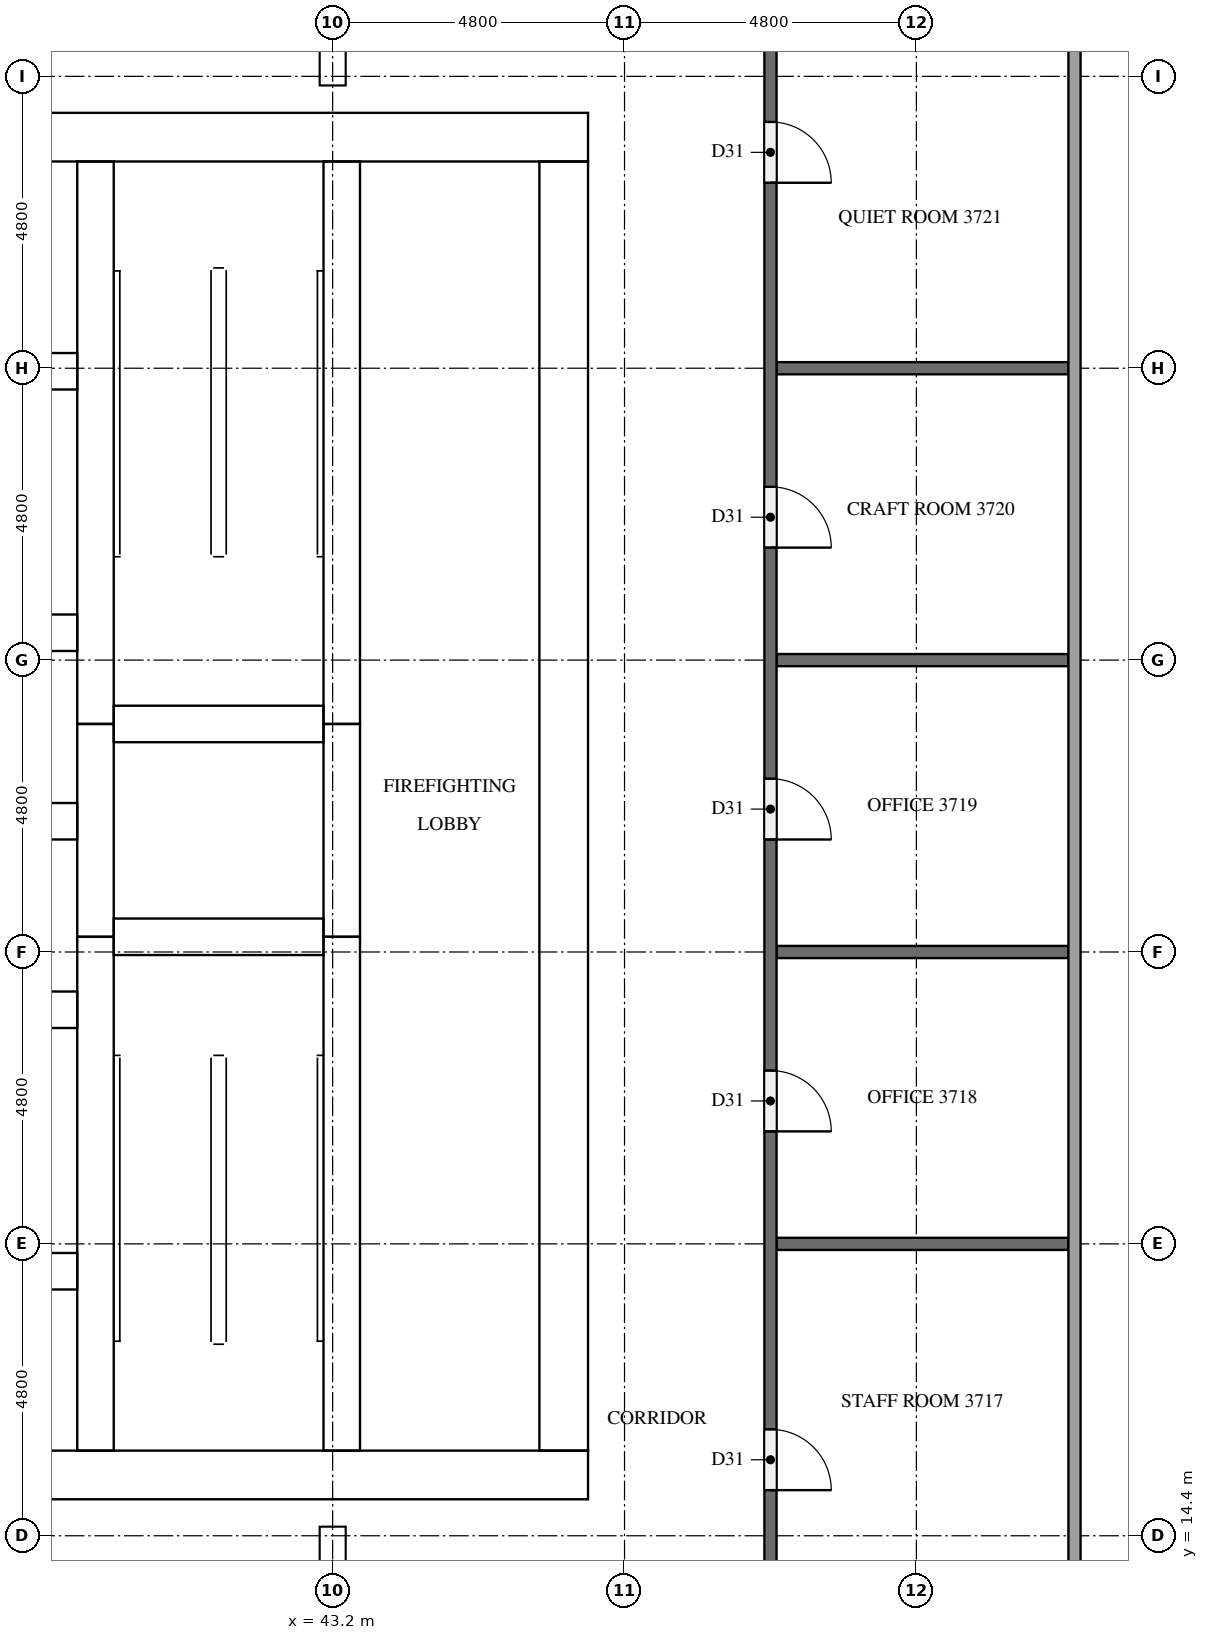
"""IFC4 building model, lengths in metres.
Left out: names, types, materials, properties, quantities, classifications, styles, units other than length and angle.
Written with IfcOpenShell. Run it as: python <this file> out.ifc"""

import sys

from ifc_helpers import new_model, si_unit, direction, frame, frame_2d, origin, place, context, subcontext, project, spatial, rectangle, extrude, element, fill, save


model = new_model("IFC4")
c1 = context("Model", 3, precision=1e-05, world=origin(), true_north=direction((0.0, 1.0)))
c2 = subcontext(c1, "Body", "Model", "MODEL_VIEW")
j1 = project(units=[si_unit("LENGTHUNIT", "METRE"), si_unit("PLANEANGLEUNIT", "RADIAN")], contexts=[c1])
p1 = place(None, origin())
s1 = spatial("IfcSite", under=j1, at=p1, CompositionType="ELEMENT")
p2 = place(p1, origin())
s2 = spatial("IfcBuilding", under=s1, at=p2, CompositionType="ELEMENT")
p3 = place(p2, frame((0.0, 0.0, 143.6)))
s3 = spatial("IfcBuildingStorey", under=s2, at=p3, CompositionType="ELEMENT", Elevation=143.6)
p4 = place(p3, frame((15.0, 15.4, 0.0), z_axis=(0.0, 0.0, 1.0), x_axis=(1.0, 0.0, 0.0)))
e1 = element("IfcWall", 1, at=p4, inside=s3, PredefinedType="SHEAR", context=c2, shape_type="SweptSolid", body=[
    extrude(rectangle(XDim=32.4, YDim=0.8, at=frame_2d((16.2, 0.0))), origin(), (0.0, 0.0, 1.0), 5.1),
])
p5 = place(p4, frame((15.3, 0.0, 0.0)))
e2 = element("IfcOpeningElement", 2, at=p5, cuts=e1, PredefinedType="OPENING", context=c2, shape_type="SweptSolid", body=[
    extrude(rectangle(XDim=1.8, YDim=2.1, at=frame_2d((0.9, 1.05))), frame((0.0, 0.41, 0.0), z_axis=(0.0, -1.0, 0.0), x_axis=(1.0, 0.0, 0.0)), (0.0, 0.0, 1.0), 0.82),
])
p6 = place(p3, frame((15.0, 37.4, 0.0), z_axis=(0.0, 0.0, 1.0), x_axis=(1.0, 0.0, 0.0)))
e3 = element("IfcWall", 3, at=p6, inside=s3, PredefinedType="SHEAR", context=c2, shape_type="SweptSolid", body=[
    extrude(rectangle(XDim=32.4, YDim=0.8, at=frame_2d((16.2, 0.0))), origin(), (0.0, 0.0, 1.0), 5.1),
])
p7 = place(p6, frame((15.3, 0.0, 0.0)))
e4 = element("IfcOpeningElement", 4, at=p7, cuts=e3, PredefinedType="OPENING", context=c2, shape_type="SweptSolid", body=[
    extrude(rectangle(XDim=1.8, YDim=2.1, at=frame_2d((0.9, 1.05))), frame((0.0, 0.41, 0.0), z_axis=(0.0, -1.0, 0.0), x_axis=(1.0, 0.0, 0.0)), (0.0, 0.0, 1.0), 0.82),
])
p8 = place(p6, frame((1.51, 0.0, 0.0)))
e5 = element("IfcOpeningElement", 5, at=p8, cuts=e3, PredefinedType="OPENING", context=c2, shape_type="SweptSolid", body=[
    extrude(rectangle(XDim=1.0, YDim=2.1, at=frame_2d((0.5, 1.05))), frame((0.0, 0.41, 0.0), z_axis=(0.0, -1.0, 0.0), x_axis=(1.0, 0.0, 0.0)), (0.0, 0.0, 1.0), 0.82),
])
p9 = place(p6, frame((5.11, 0.0, 0.0)))
e6 = element("IfcOpeningElement", 6, at=p9, cuts=e3, PredefinedType="OPENING", context=c2, shape_type="SweptSolid", body=[
    extrude(rectangle(XDim=1.0, YDim=2.1, at=frame_2d((0.5, 1.05))), frame((0.0, 0.41, 0.0), z_axis=(0.0, -1.0, 0.0), x_axis=(1.0, 0.0, 0.0)), (0.0, 0.0, 1.0), 0.82),
])
p10 = place(p3, frame((47.0, 15.8, 0.0), z_axis=(0.0, 0.0, 1.0), x_axis=(0.0, 1.0, 0.0)))
e7 = element("IfcWall", 7, at=p10, inside=s3, PredefinedType="SHEAR", context=c2, shape_type="SweptSolid", body=[
    extrude(rectangle(XDim=21.2, YDim=0.8, at=frame_2d((10.6, 0.0))), origin(), (0.0, 0.0, 1.0), 5.1),
])
p11 = place(p10, frame((10.3, 0.0, 0.0)))
e8 = element("IfcOpeningElement", 8, at=p11, cuts=e7, PredefinedType="OPENING", context=c2, shape_type="SweptSolid", body=[
    extrude(rectangle(XDim=1.2, YDim=2.1, at=frame_2d((0.6, 1.05))), frame((0.0, 0.41, 0.0), z_axis=(0.0, -1.0, 0.0), x_axis=(1.0, 0.0, 0.0)), (0.0, 0.0, 1.0), 0.82),
])
p12 = place(p3, frame((39.3, 15.8, 0.0), z_axis=(0.0, 0.0, 1.0), x_axis=(0.0, 1.0, 0.0)))
e9 = element("IfcWall", 9, at=p12, inside=s3, PredefinedType="SHEAR", context=c2, shape_type="SweptSolid", body=[
    extrude(rectangle(XDim=8.45, YDim=0.6, at=frame_2d((4.225, 0.0))), origin(), (0.0, 0.0, 1.0), 5.1),
])
p13 = place(p3, frame((39.3, 24.25, 0.0), z_axis=(0.0, 0.0, 1.0), x_axis=(0.0, 1.0, 0.0)))
e10 = element("IfcWall", 10, at=p13, inside=s3, PredefinedType="SHEAR", context=c2, shape_type="SweptSolid", body=[
    extrude(rectangle(XDim=3.5, YDim=0.6, at=frame_2d((1.75, 0.0))), origin(), (0.0, 0.0, 1.0), 5.1),
])
p14 = place(p3, frame((39.3, 27.75, 0.0), z_axis=(0.0, 0.0, 1.0), x_axis=(0.0, 1.0, 0.0)))
e11 = element("IfcWall", 11, at=p14, inside=s3, PredefinedType="SHEAR", context=c2, shape_type="SweptSolid", body=[
    extrude(rectangle(XDim=9.25, YDim=0.6, at=frame_2d((4.625, 0.0))), origin(), (0.0, 0.0, 1.0), 5.1),
])
p15 = place(p3, frame((43.35, 15.8, 0.0), z_axis=(0.0, 0.0, 1.0), x_axis=(0.0, 1.0, 0.0)))
e12 = element("IfcWall", 12, at=p15, inside=s3, PredefinedType="SHEAR", context=c2, shape_type="SweptSolid", body=[
    extrude(rectangle(XDim=8.45, YDim=0.6, at=frame_2d((4.225, 0.0))), origin(), (0.0, 0.0, 1.0), 5.1),
])
p16 = place(p15, frame((0.4, 0.0, 0.0)))
e13 = element("IfcOpeningElement", 13, at=p16, cuts=e12, PredefinedType="OPENING", context=c2, shape_type="SweptSolid", body=[
    extrude(rectangle(XDim=1.2, YDim=2.1, at=frame_2d((0.6, 1.05))), frame((0.0, 0.31, 0.0), z_axis=(0.0, -1.0, 0.0), x_axis=(1.0, 0.0, 0.0)), (0.0, 0.0, 1.0), 0.62),
])
p17 = place(p3, frame((43.35, 24.25, 0.0), z_axis=(0.0, 0.0, 1.0), x_axis=(0.0, 1.0, 0.0)))
e14 = element("IfcWall", 14, at=p17, inside=s3, PredefinedType="SHEAR", context=c2, shape_type="SweptSolid", body=[
    extrude(rectangle(XDim=3.5, YDim=0.6, at=frame_2d((1.75, 0.0))), origin(), (0.0, 0.0, 1.0), 5.1),
])
p18 = place(p17, frame((1.2, 0.0, 0.0)))
e15 = element("IfcOpeningElement", 15, at=p18, cuts=e14, PredefinedType="OPENING", context=c2, shape_type="SweptSolid", body=[
    extrude(rectangle(XDim=1.1, YDim=2.1, at=frame_2d((0.55, 1.05))), frame((0.0, 0.31, 0.0), z_axis=(0.0, -1.0, 0.0), x_axis=(1.0, 0.0, 0.0)), (0.0, 0.0, 1.0), 0.62),
])
p19 = place(p3, frame((43.35, 27.75, 0.0), z_axis=(0.0, 0.0, 1.0), x_axis=(0.0, 1.0, 0.0)))
e16 = element("IfcWall", 16, at=p19, inside=s3, PredefinedType="SHEAR", context=c2, shape_type="SweptSolid", body=[
    extrude(rectangle(XDim=9.25, YDim=0.6, at=frame_2d((4.625, 0.0))), origin(), (0.0, 0.0, 1.0), 5.1),
])
p20 = place(p19, frame((7.65, 0.0, 0.0)))
e17 = element("IfcOpeningElement", 17, at=p20, cuts=e16, PredefinedType="OPENING", context=c2, shape_type="SweptSolid", body=[
    extrude(rectangle(XDim=1.2, YDim=2.1, at=frame_2d((0.6, 1.05))), frame((0.0, 0.31, 0.0), z_axis=(0.0, -1.0, 0.0), x_axis=(1.0, 0.0, 0.0)), (0.0, 0.0, 1.0), 0.62),
])
for number, where, z_axis, x_axis in (
    (18, (39.6, 24.25, 0.0), (0.0, 0.0, 1.0), (1.0, 0.0, 0.0)),
    (19, (39.6, 27.75, 0.0), (0.0, 0.0, 1.0), (1.0, 0.0, 0.0)),
):
    element("IfcWall", number, at=place(p3, frame(where, z_axis=z_axis, x_axis=x_axis)), inside=s3, PredefinedType="SHEAR", context=c2, shape_type="SweptSolid", body=[
        extrude(rectangle(XDim=3.45, YDim=0.6, at=frame_2d((1.725, 0.0))), origin(), (0.0, 0.0, 1.0), 5.1),
    ])
p21 = place(p3, frame((33.4, 18.75, 0.0), z_axis=(0.0, 0.0, 1.0), x_axis=(1.0, 0.0, 0.0)))
e20 = element("IfcWall", 20, at=p21, inside=s3, PredefinedType="SHEAR", context=c2, shape_type="SweptSolid", body=[
    extrude(rectangle(XDim=5.6, YDim=0.6, at=frame_2d((2.8, 0.0))), origin(), (0.0, 0.0, 1.0), 5.1),
])
p22 = place(p21, frame((1.25, 0.0, 0.0)))
e21 = element("IfcOpeningElement", 21, at=p22, cuts=e20, PredefinedType="OPENING", context=c2, shape_type="SweptSolid", body=[
    extrude(rectangle(XDim=1.1, YDim=2.1, at=frame_2d((0.55, 1.05))), frame((0.0, 0.31, 0.0), z_axis=(0.0, -1.0, 0.0), x_axis=(1.0, 0.0, 0.0)), (0.0, 0.0, 1.0), 0.62),
])
p23 = place(p21, frame((3.85, 0.0, 0.0)))
e22 = element("IfcOpeningElement", 22, at=p23, cuts=e20, PredefinedType="OPENING", context=c2, shape_type="SweptSolid", body=[
    extrude(rectangle(XDim=1.1, YDim=2.1, at=frame_2d((0.55, 1.05))), frame((0.0, 0.31, 0.0), z_axis=(0.0, -1.0, 0.0), x_axis=(1.0, 0.0, 0.0)), (0.0, 0.0, 1.0), 0.62),
])
p24 = place(p3, frame((23.4, 23.05, 0.0), z_axis=(0.0, 0.0, 1.0), x_axis=(1.0, 0.0, 0.0)))
e23 = element("IfcWall", 23, at=p24, inside=s3, PredefinedType="SHEAR", context=c2, shape_type="SweptSolid", body=[
    extrude(rectangle(XDim=15.6, YDim=0.6, at=frame_2d((7.8, 0.0))), origin(), (0.0, 0.0, 1.0), 5.1),
])
p25 = place(p24, frame((0.311, 0.0, 0.0)))
e24 = element("IfcOpeningElement", 24, at=p25, cuts=e23, PredefinedType="OPENING", context=c2, shape_type="SweptSolid", body=[
    extrude(rectangle(XDim=1.0, YDim=2.1, at=frame_2d((0.5, 1.05))), frame((0.0, 0.31, 0.0), z_axis=(0.0, -1.0, 0.0), x_axis=(1.0, 0.0, 0.0)), (0.0, 0.0, 1.0), 0.62),
])
p26 = place(p24, frame((2.945, 0.0, 0.0)))
e25 = element("IfcOpeningElement", 25, at=p26, cuts=e23, PredefinedType="OPENING", context=c2, shape_type="SweptSolid", body=[
    extrude(rectangle(XDim=1.0, YDim=2.1, at=frame_2d((0.5, 1.05))), frame((0.0, 0.31, 0.0), z_axis=(0.0, -1.0, 0.0), x_axis=(1.0, 0.0, 0.0)), (0.0, 0.0, 1.0), 0.62),
])
p27 = place(p24, frame((10.845, 0.0, 0.0)))
e26 = element("IfcOpeningElement", 26, at=p27, cuts=e23, PredefinedType="OPENING", context=c2, shape_type="SweptSolid", body=[
    extrude(rectangle(XDim=1.0, YDim=2.1, at=frame_2d((0.5, 1.05))), frame((0.0, 0.31, 0.0), z_axis=(0.0, -1.0, 0.0), x_axis=(1.0, 0.0, 0.0)), (0.0, 0.0, 1.0), 0.62),
])
p28 = place(p24, frame((13.478, 0.0, 0.0)))
e27 = element("IfcOpeningElement", 27, at=p28, cuts=e23, PredefinedType="OPENING", context=c2, shape_type="SweptSolid", body=[
    extrude(rectangle(XDim=1.0, YDim=2.1, at=frame_2d((0.5, 1.05))), frame((0.0, 0.31, 0.0), z_axis=(0.0, -1.0, 0.0), x_axis=(1.0, 0.0, 0.0)), (0.0, 0.0, 1.0), 0.62),
])
p29 = place(p3, frame((23.4, 26.15, 0.0), z_axis=(0.0, 0.0, 1.0), x_axis=(1.0, 0.0, 0.0)))
e28 = element("IfcWall", 28, at=p29, inside=s3, PredefinedType="SHEAR", context=c2, shape_type="SweptSolid", body=[
    extrude(rectangle(XDim=15.6, YDim=0.6, at=frame_2d((7.8, 0.0))), origin(), (0.0, 0.0, 1.0), 5.1),
])
p30 = place(p3, frame((23.4, 29.25, 0.0), z_axis=(0.0, 0.0, 1.0), x_axis=(1.0, 0.0, 0.0)))
e29 = element("IfcWall", 29, at=p30, inside=s3, PredefinedType="SHEAR", context=c2, shape_type="SweptSolid", body=[
    extrude(rectangle(XDim=15.6, YDim=0.6, at=frame_2d((7.8, 0.0))), origin(), (0.0, 0.0, 1.0), 5.1),
])
p31 = place(p30, frame((0.667, 0.0, 0.0)))
e30 = element("IfcOpeningElement", 30, at=p31, cuts=e29, PredefinedType="OPENING", context=c2, shape_type="SweptSolid", body=[
    extrude(rectangle(XDim=1.1, YDim=2.1, at=frame_2d((0.55, 1.05))), frame((0.0, 0.31, 0.0), z_axis=(0.0, -1.0, 0.0), x_axis=(1.0, 0.0, 0.0)), (0.0, 0.0, 1.0), 0.62),
])
p32 = place(p30, frame((3.3, 0.0, 0.0)))
e31 = element("IfcOpeningElement", 31, at=p32, cuts=e29, PredefinedType="OPENING", context=c2, shape_type="SweptSolid", body=[
    extrude(rectangle(XDim=1.1, YDim=2.1, at=frame_2d((0.55, 1.05))), frame((0.0, 0.31, 0.0), z_axis=(0.0, -1.0, 0.0), x_axis=(1.0, 0.0, 0.0)), (0.0, 0.0, 1.0), 0.62),
])
p33 = place(p30, frame((5.933, 0.0, 0.0)))
e32 = element("IfcOpeningElement", 32, at=p33, cuts=e29, PredefinedType="OPENING", context=c2, shape_type="SweptSolid", body=[
    extrude(rectangle(XDim=1.1, YDim=2.1, at=frame_2d((0.55, 1.05))), frame((0.0, 0.31, 0.0), z_axis=(0.0, -1.0, 0.0), x_axis=(1.0, 0.0, 0.0)), (0.0, 0.0, 1.0), 0.62),
])
p34 = place(p30, frame((8.567, 0.0, 0.0)))
e33 = element("IfcOpeningElement", 33, at=p34, cuts=e29, PredefinedType="OPENING", context=c2, shape_type="SweptSolid", body=[
    extrude(rectangle(XDim=1.1, YDim=2.1, at=frame_2d((0.55, 1.05))), frame((0.0, 0.31, 0.0), z_axis=(0.0, -1.0, 0.0), x_axis=(1.0, 0.0, 0.0)), (0.0, 0.0, 1.0), 0.62),
])
p35 = place(p30, frame((11.2, 0.0, 0.0)))
e34 = element("IfcOpeningElement", 34, at=p35, cuts=e29, PredefinedType="OPENING", context=c2, shape_type="SweptSolid", body=[
    extrude(rectangle(XDim=1.1, YDim=2.1, at=frame_2d((0.55, 1.05))), frame((0.0, 0.31, 0.0), z_axis=(0.0, -1.0, 0.0), x_axis=(1.0, 0.0, 0.0)), (0.0, 0.0, 1.0), 0.62),
])
p36 = place(p30, frame((13.833, 0.0, 0.0)))
e35 = element("IfcOpeningElement", 35, at=p36, cuts=e29, PredefinedType="OPENING", context=c2, shape_type="SweptSolid", body=[
    extrude(rectangle(XDim=1.1, YDim=2.1, at=frame_2d((0.55, 1.05))), frame((0.0, 0.31, 0.0), z_axis=(0.0, -1.0, 0.0), x_axis=(1.0, 0.0, 0.0)), (0.0, 0.0, 1.0), 0.62),
])
p37 = place(p3, frame((33.4, 33.55, 0.0), z_axis=(0.0, 0.0, 1.0), x_axis=(1.0, 0.0, 0.0)))
e36 = element("IfcWall", 36, at=p37, inside=s3, PredefinedType="SHEAR", context=c2, shape_type="SweptSolid", body=[
    extrude(rectangle(XDim=5.6, YDim=0.6, at=frame_2d((2.8, 0.0))), origin(), (0.0, 0.0, 1.0), 5.1),
])
p38 = place(p37, frame((1.25, 0.0, 0.0)))
e37 = element("IfcOpeningElement", 37, at=p38, cuts=e36, PredefinedType="OPENING", context=c2, shape_type="SweptSolid", body=[
    extrude(rectangle(XDim=1.1, YDim=2.1, at=frame_2d((0.55, 1.05))), frame((0.0, 0.31, 0.0), z_axis=(0.0, -1.0, 0.0), x_axis=(1.0, 0.0, 0.0)), (0.0, 0.0, 1.0), 0.62),
])
p39 = place(p37, frame((3.85, 0.0, 0.0)))
e38 = element("IfcOpeningElement", 38, at=p39, cuts=e36, PredefinedType="OPENING", context=c2, shape_type="SweptSolid", body=[
    extrude(rectangle(XDim=1.1, YDim=2.1, at=frame_2d((0.55, 1.05))), frame((0.0, 0.31, 0.0), z_axis=(0.0, -1.0, 0.0), x_axis=(1.0, 0.0, 0.0)), (0.0, 0.0, 1.0), 0.62),
])
for number, where, z_axis, x_axis in (
    (39, (50.5, 19.2, 0.0), (0.0, 0.0, 1.0), (1.0, 0.0, 0.0)),
    (40, (50.5, 24.0, 0.0), (0.0, 0.0, 1.0), (1.0, 0.0, 0.0)),
    (41, (50.5, 28.8, 0.0), (0.0, 0.0, 1.0), (1.0, 0.0, 0.0)),
    (42, (50.5, 33.6, 0.0), (0.0, 0.0, 1.0), (1.0, 0.0, 0.0)),
):
    element("IfcWall", number, at=place(p3, frame(where, z_axis=z_axis, x_axis=x_axis)), inside=s3, PredefinedType="PARTITIONING", context=c2, shape_type="SweptSolid", body=[
        extrude(rectangle(XDim=4.8, YDim=0.2, at=frame_2d((2.4, 0.0))), origin(), (0.0, 0.0, 1.0), 5.1),
    ])
p40 = place(p3, frame((50.4, 40.7, 0.0), z_axis=(0.0, 0.0, 1.0), x_axis=(0.0, -1.0, 0.0)))
e43 = element("IfcWall", 43, at=p40, inside=s3, PredefinedType="PARTITIONING", context=c2, shape_type="SweptSolid", body=[
    extrude(rectangle(XDim=28.6, YDim=0.2, at=frame_2d((14.3, 0.0))), origin(), (0.0, 0.0, 1.0), 5.1),
])
p41 = place(p40, frame((24.55, 0.0, 0.0)))
e44 = element("IfcOpeningElement", 44, at=p41, cuts=e43, PredefinedType="OPENING", context=c2, shape_type="SweptSolid", body=[
    extrude(rectangle(XDim=1.0, YDim=2.1, at=frame_2d((0.5, 1.05))), frame((0.0, 0.11, 0.0), z_axis=(0.0, -1.0, 0.0), x_axis=(1.0, 0.0, 0.0)), (0.0, 0.0, 1.0), 0.22),
])
p42 = place(p40, frame((18.65, 0.0, 0.0)))
e45 = element("IfcOpeningElement", 45, at=p42, cuts=e43, PredefinedType="OPENING", context=c2, shape_type="SweptSolid", body=[
    extrude(rectangle(XDim=1.0, YDim=2.1, at=frame_2d((0.5, 1.05))), frame((0.0, 0.11, 0.0), z_axis=(0.0, -1.0, 0.0), x_axis=(1.0, 0.0, 0.0)), (0.0, 0.0, 1.0), 0.22),
])
p43 = place(p40, frame((13.85, 0.0, 0.0)))
e46 = element("IfcOpeningElement", 46, at=p43, cuts=e43, PredefinedType="OPENING", context=c2, shape_type="SweptSolid", body=[
    extrude(rectangle(XDim=1.0, YDim=2.1, at=frame_2d((0.5, 1.05))), frame((0.0, 0.11, 0.0), z_axis=(0.0, -1.0, 0.0), x_axis=(1.0, 0.0, 0.0)), (0.0, 0.0, 1.0), 0.22),
])
p44 = place(p40, frame((9.05, 0.0, 0.0)))
e47 = element("IfcOpeningElement", 47, at=p44, cuts=e43, PredefinedType="OPENING", context=c2, shape_type="SweptSolid", body=[
    extrude(rectangle(XDim=1.0, YDim=2.1, at=frame_2d((0.5, 1.05))), frame((0.0, 0.11, 0.0), z_axis=(0.0, -1.0, 0.0), x_axis=(1.0, 0.0, 0.0)), (0.0, 0.0, 1.0), 0.22),
])
p45 = place(p40, frame((3.05, 0.0, 0.0)))
e48 = element("IfcOpeningElement", 48, at=p45, cuts=e43, PredefinedType="OPENING", context=c2, shape_type="SweptSolid", body=[
    extrude(rectangle(XDim=1.0, YDim=2.1, at=frame_2d((0.5, 1.05))), frame((0.0, 0.11, 0.0), z_axis=(0.0, -1.0, 0.0), x_axis=(1.0, 0.0, 0.0)), (0.0, 0.0, 1.0), 0.22),
])
p46 = place(p18, origin())
e49 = element("IfcDoor", 49, at=p46, inside=s3, OperationType="DOUBLE_DOOR_SLIDING", PredefinedType="DOOR", context=c2, shape_type="SweptSolid", body=[
    extrude(rectangle(XDim=1.1, YDim=2.1, at=frame_2d((0.55, 1.05))), frame((0.0, 0.025, 0.0), z_axis=(0.0, -1.0, 0.0), x_axis=(1.0, 0.0, 0.0)), (0.0, 0.0, 1.0), 0.05),
])
fill(e15, e49)
p47 = place(p16, origin())
e50 = element("IfcDoor", 50, at=p47, inside=s3, OperationType="SINGLE_SWING_RIGHT", PredefinedType="DOOR", context=c2, shape_type="SweptSolid", body=[
    extrude(rectangle(XDim=1.2, YDim=2.1, at=frame_2d((0.6, 1.05))), frame((0.0, 0.025, 0.0), z_axis=(0.0, -1.0, 0.0), x_axis=(1.0, 0.0, 0.0)), (0.0, 0.0, 1.0), 0.05),
])
fill(e13, e50)
p48 = place(p20, origin())
e51 = element("IfcDoor", 51, at=p48, inside=s3, OperationType="SINGLE_SWING_LEFT", PredefinedType="DOOR", context=c2, shape_type="SweptSolid", body=[
    extrude(rectangle(XDim=1.2, YDim=2.1, at=frame_2d((0.6, 1.05))), frame((0.0, 0.025, 0.0), z_axis=(0.0, -1.0, 0.0), x_axis=(1.0, 0.0, 0.0)), (0.0, 0.0, 1.0), 0.05),
])
fill(e17, e51)
p49 = place(p11, origin())
e52 = element("IfcDoor", 52, at=p49, inside=s3, OperationType="SINGLE_SWING_LEFT", PredefinedType="DOOR", context=c2, shape_type="SweptSolid", body=[
    extrude(rectangle(XDim=1.2, YDim=2.1, at=frame_2d((0.6, 1.05))), frame((0.0, 0.025, 0.0), z_axis=(0.0, -1.0, 0.0), x_axis=(1.0, 0.0, 0.0)), (0.0, 0.0, 1.0), 0.05),
])
fill(e8, e52)
p50 = place(p41, origin())
e53 = element("IfcDoor", 53, at=p50, inside=s3, OperationType="SINGLE_SWING_RIGHT", PredefinedType="DOOR", context=c2, shape_type="SweptSolid", body=[
    extrude(rectangle(XDim=1.0, YDim=2.1, at=frame_2d((0.5, 1.05))), frame((0.0, 0.025, 0.0), z_axis=(0.0, -1.0, 0.0), x_axis=(1.0, 0.0, 0.0)), (0.0, 0.0, 1.0), 0.05),
])
fill(e44, e53)
p51 = place(p42, origin())
e54 = element("IfcDoor", 54, at=p51, inside=s3, OperationType="SINGLE_SWING_RIGHT", PredefinedType="DOOR", context=c2, shape_type="SweptSolid", body=[
    extrude(rectangle(XDim=1.0, YDim=2.1, at=frame_2d((0.5, 1.05))), frame((0.0, 0.025, 0.0), z_axis=(0.0, -1.0, 0.0), x_axis=(1.0, 0.0, 0.0)), (0.0, 0.0, 1.0), 0.05),
])
fill(e45, e54)
p52 = place(p43, origin())
e55 = element("IfcDoor", 55, at=p52, inside=s3, OperationType="SINGLE_SWING_RIGHT", PredefinedType="DOOR", context=c2, shape_type="SweptSolid", body=[
    extrude(rectangle(XDim=1.0, YDim=2.1, at=frame_2d((0.5, 1.05))), frame((0.0, 0.025, 0.0), z_axis=(0.0, -1.0, 0.0), x_axis=(1.0, 0.0, 0.0)), (0.0, 0.0, 1.0), 0.05),
])
fill(e46, e55)
p53 = place(p44, origin())
e56 = element("IfcDoor", 56, at=p53, inside=s3, OperationType="SINGLE_SWING_RIGHT", PredefinedType="DOOR", context=c2, shape_type="SweptSolid", body=[
    extrude(rectangle(XDim=1.0, YDim=2.1, at=frame_2d((0.5, 1.05))), frame((0.0, 0.025, 0.0), z_axis=(0.0, -1.0, 0.0), x_axis=(1.0, 0.0, 0.0)), (0.0, 0.0, 1.0), 0.05),
])
fill(e47, e56)
p54 = place(p45, origin())
e57 = element("IfcDoor", 57, at=p54, inside=s3, OperationType="SINGLE_SWING_RIGHT", PredefinedType="DOOR", context=c2, shape_type="SweptSolid", body=[
    extrude(rectangle(XDim=1.0, YDim=2.1, at=frame_2d((0.5, 1.05))), frame((0.0, 0.025, 0.0), z_axis=(0.0, -1.0, 0.0), x_axis=(1.0, 0.0, 0.0)), (0.0, 0.0, 1.0), 0.05),
])
fill(e48, e57)
save(model, sys.argv[1])
